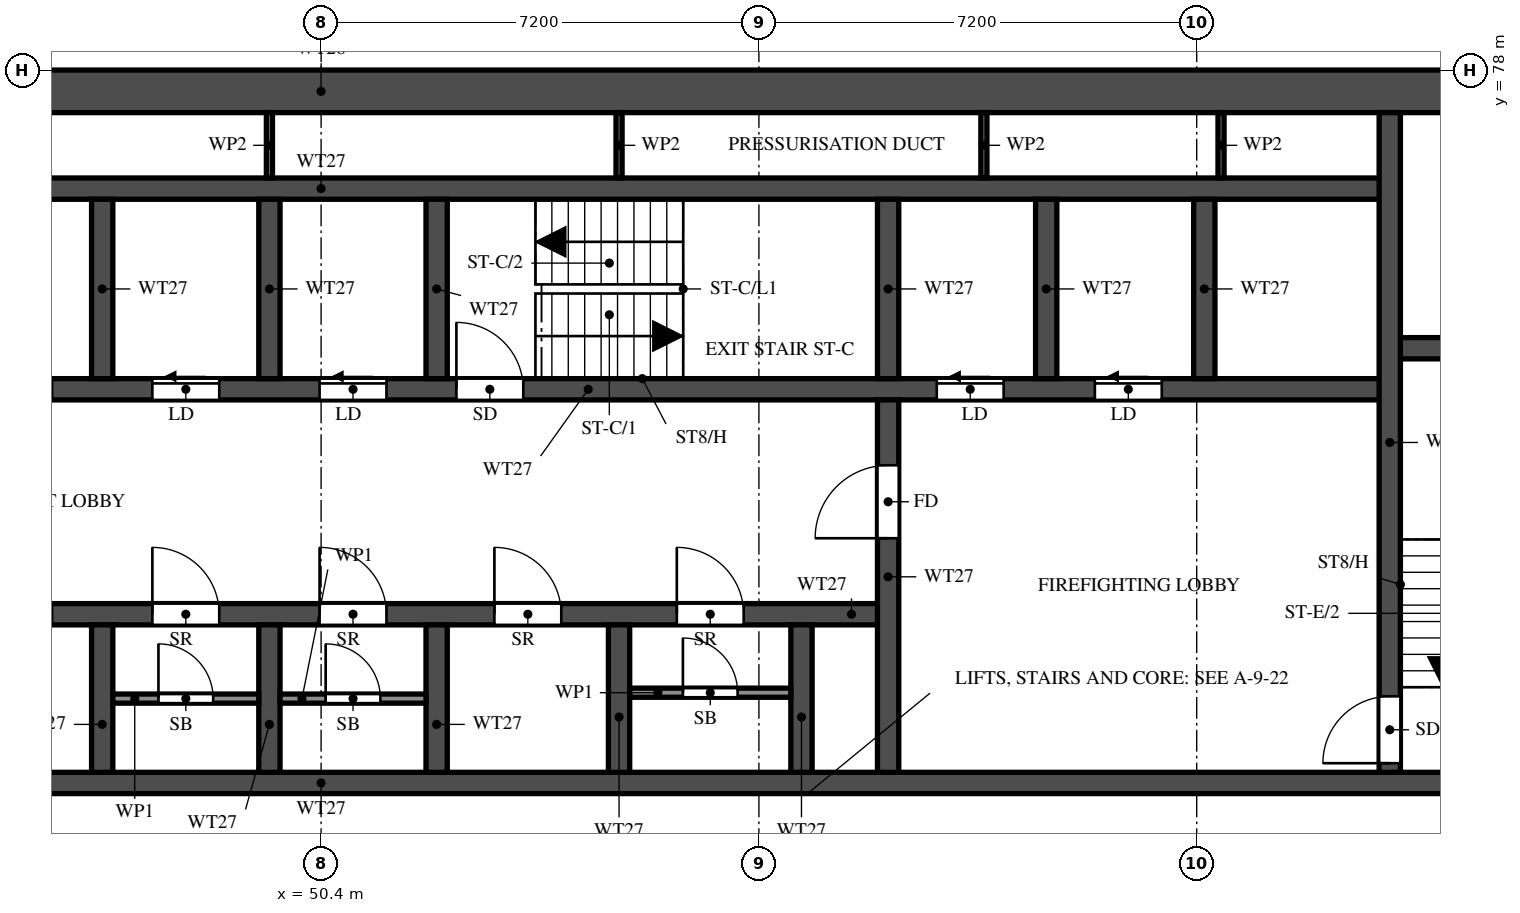
"""IFC4 building model, lengths in metres.
Left out: names, types, materials, properties, quantities, classifications, styles, units other than length and angle.
Written with IfcOpenShell. Run it as: python <this file> out.ifc"""

import sys

from ifc_helpers import new_model, si_unit, direction, frame, frame_2d, origin, place, context, subcontext, project, spatial, rectangle, extrude, element, fill, save


model = new_model("IFC4")
c1 = context("Model", 3, precision=1e-05, world=origin(), true_north=direction((0.0, 1.0)))
c2 = subcontext(c1, "Body", "Model", "MODEL_VIEW")
j1 = project(units=[si_unit("LENGTHUNIT", "METRE"), si_unit("PLANEANGLEUNIT", "RADIAN")], contexts=[c1])
p1 = place(None, origin())
s1 = spatial("IfcSite", under=j1, at=p1, CompositionType="ELEMENT")
p2 = place(p1, origin())
s2 = spatial("IfcBuilding", under=s1, at=p2, CompositionType="ELEMENT")
p3 = place(p2, frame((0.0, 0.0, 153.5)))
s3 = spatial("IfcBuildingStorey", under=s2, at=p3, CompositionType="ELEMENT", Elevation=153.5)
p4 = place(p3, frame((29.7, 77.65, 0.0), z_axis=(0.0, 0.0, 1.0), x_axis=(1.0, 0.0, 0.0)))
e1 = element("IfcWall", 1, at=p4, inside=s3, PredefinedType="SHEAR", context=c2, shape_type="SweptSolid", body=[
    extrude(rectangle(XDim=41.4, YDim=0.7, at=frame_2d((20.7, 0.0))), origin(), (0.0, 0.0, 1.0), 3.2),
])
p5 = place(p3, frame((29.7, 66.275, 0.0), z_axis=(0.0, 0.0, 1.0), x_axis=(1.0, 0.0, 0.0)))
e2 = element("IfcWall", 2, at=p5, inside=s3, PredefinedType="SHEAR", context=c2, shape_type="SweptSolid", body=[
    extrude(rectangle(XDim=41.4, YDim=0.35, at=frame_2d((20.7, 0.0))), origin(), (0.0, 0.0, 1.0), 3.2),
])
p6 = place(p5, frame((0.925, 0.0, 0.0)))
e3 = element("IfcOpeningElement", 3, at=p6, cuts=e2, PredefinedType="OPENING", context=c2, shape_type="SweptSolid", body=[
    extrude(rectangle(XDim=1.1, YDim=2.1, at=frame_2d((0.55, 1.05))), frame((0.0, 0.185, 0.0), z_axis=(0.0, -1.0, 0.0), x_axis=(1.0, 0.0, 0.0)), (0.0, 0.0, 1.0), 0.37),
])
p7 = place(p5, frame((3.712, 0.0, 0.0)))
e4 = element("IfcOpeningElement", 4, at=p7, cuts=e2, PredefinedType="OPENING", context=c2, shape_type="SweptSolid", body=[
    extrude(rectangle(XDim=1.8, YDim=2.1, at=frame_2d((0.9, 1.05))), frame((0.0, 0.185, 0.0), z_axis=(0.0, -1.0, 0.0), x_axis=(1.0, 0.0, 0.0)), (0.0, 0.0, 1.0), 0.37),
])
p8 = place(p3, frame((35.625, 69.05, 0.0), z_axis=(0.0, 0.0, 1.0), x_axis=(1.0, 0.0, 0.0)))
e5 = element("IfcWall", 5, at=p8, inside=s3, PredefinedType="SHEAR", context=c2, shape_type="SweptSolid", body=[
    extrude(rectangle(XDim=24.1, YDim=0.35, at=frame_2d((12.05, 0.0))), origin(), (0.0, 0.0, 1.0), 3.2),
])
p9 = place(p8, frame((1.0, 0.0, 0.0)))
e6 = element("IfcOpeningElement", 6, at=p9, cuts=e5, PredefinedType="OPENING", context=c2, shape_type="SweptSolid", body=[
    extrude(rectangle(XDim=1.1, YDim=2.1, at=frame_2d((0.55, 1.05))), frame((0.0, 0.185, 0.0), z_axis=(0.0, -1.0, 0.0), x_axis=(1.0, 0.0, 0.0)), (0.0, 0.0, 1.0), 0.37),
])
p10 = place(p8, frame((3.75, 0.0, 0.0)))
e7 = element("IfcOpeningElement", 7, at=p10, cuts=e5, PredefinedType="OPENING", context=c2, shape_type="SweptSolid", body=[
    extrude(rectangle(XDim=1.1, YDim=2.1, at=frame_2d((0.55, 1.05))), frame((0.0, 0.185, 0.0), z_axis=(0.0, -1.0, 0.0), x_axis=(1.0, 0.0, 0.0)), (0.0, 0.0, 1.0), 0.37),
])
p11 = place(p8, frame((6.5, 0.0, 0.0)))
e8 = element("IfcOpeningElement", 8, at=p11, cuts=e5, PredefinedType="OPENING", context=c2, shape_type="SweptSolid", body=[
    extrude(rectangle(XDim=1.1, YDim=2.1, at=frame_2d((0.55, 1.05))), frame((0.0, 0.185, 0.0), z_axis=(0.0, -1.0, 0.0), x_axis=(1.0, 0.0, 0.0)), (0.0, 0.0, 1.0), 0.37),
])
p12 = place(p8, frame((9.25, 0.0, 0.0)))
e9 = element("IfcOpeningElement", 9, at=p12, cuts=e5, PredefinedType="OPENING", context=c2, shape_type="SweptSolid", body=[
    extrude(rectangle(XDim=1.1, YDim=2.1, at=frame_2d((0.55, 1.05))), frame((0.0, 0.185, 0.0), z_axis=(0.0, -1.0, 0.0), x_axis=(1.0, 0.0, 0.0)), (0.0, 0.0, 1.0), 0.37),
])
p13 = place(p8, frame((12.0, 0.0, 0.0)))
e10 = element("IfcOpeningElement", 10, at=p13, cuts=e5, PredefinedType="OPENING", context=c2, shape_type="SweptSolid", body=[
    extrude(rectangle(XDim=1.1, YDim=2.1, at=frame_2d((0.55, 1.05))), frame((0.0, 0.185, 0.0), z_axis=(0.0, -1.0, 0.0), x_axis=(1.0, 0.0, 0.0)), (0.0, 0.0, 1.0), 0.37),
])
p14 = place(p8, frame((14.75, 0.0, 0.0)))
e11 = element("IfcOpeningElement", 11, at=p14, cuts=e5, PredefinedType="OPENING", context=c2, shape_type="SweptSolid", body=[
    extrude(rectangle(XDim=1.1, YDim=2.1, at=frame_2d((0.55, 1.05))), frame((0.0, 0.185, 0.0), z_axis=(0.0, -1.0, 0.0), x_axis=(1.0, 0.0, 0.0)), (0.0, 0.0, 1.0), 0.37),
])
p15 = place(p8, frame((17.625, 0.0, 0.0)))
e12 = element("IfcOpeningElement", 12, at=p15, cuts=e5, PredefinedType="OPENING", context=c2, shape_type="SweptSolid", body=[
    extrude(rectangle(XDim=1.1, YDim=2.1, at=frame_2d((0.55, 1.05))), frame((0.0, 0.185, 0.0), z_axis=(0.0, -1.0, 0.0), x_axis=(1.0, 0.0, 0.0)), (0.0, 0.0, 1.0), 0.37),
])
p16 = place(p8, frame((20.625, 0.0, 0.0)))
e13 = element("IfcOpeningElement", 13, at=p16, cuts=e5, PredefinedType="OPENING", context=c2, shape_type="SweptSolid", body=[
    extrude(rectangle(XDim=1.1, YDim=2.1, at=frame_2d((0.55, 1.05))), frame((0.0, 0.185, 0.0), z_axis=(0.0, -1.0, 0.0), x_axis=(1.0, 0.0, 0.0)), (0.0, 0.0, 1.0), 0.37),
])
p17 = place(p3, frame((32.825, 72.75, 0.0), z_axis=(0.0, 0.0, 1.0), x_axis=(1.0, 0.0, 0.0)))
e14 = element("IfcWall", 14, at=p17, inside=s3, PredefinedType="SHEAR", context=c2, shape_type="SweptSolid", body=[
    extrude(rectangle(XDim=35.15, YDim=0.35, at=frame_2d((17.575, 0.0))), origin(), (0.0, 0.0, 1.0), 3.2),
])
p18 = place(p17, frame((19.8, 0.0, 0.0)))
e15 = element("IfcOpeningElement", 15, at=p18, cuts=e14, PredefinedType="OPENING", context=c2, shape_type="SweptSolid", body=[
    extrude(rectangle(XDim=1.1, YDim=2.1, at=frame_2d((0.55, 1.05))), frame((0.0, 0.185, 0.0), z_axis=(0.0, -1.0, 0.0), x_axis=(1.0, 0.0, 0.0)), (0.0, 0.0, 1.0), 0.37),
])
p19 = place(p17, frame((27.7, 0.0, 0.0)))
e16 = element("IfcOpeningElement", 16, at=p19, cuts=e14, PredefinedType="OPENING", context=c2, shape_type="SweptSolid", body=[
    extrude(rectangle(XDim=1.1, YDim=2.1, at=frame_2d((0.55, 1.05))), frame((0.0, 0.185, 0.0), z_axis=(0.0, -1.0, 0.0), x_axis=(1.0, 0.0, 0.0)), (0.0, 0.0, 1.0), 0.37),
])
p20 = place(p17, frame((30.3, 0.0, 0.0)))
e17 = element("IfcOpeningElement", 17, at=p20, cuts=e14, PredefinedType="OPENING", context=c2, shape_type="SweptSolid", body=[
    extrude(rectangle(XDim=1.1, YDim=2.1, at=frame_2d((0.55, 1.05))), frame((0.0, 0.185, 0.0), z_axis=(0.0, -1.0, 0.0), x_axis=(1.0, 0.0, 0.0)), (0.0, 0.0, 1.0), 0.37),
])
p21 = place(p17, frame((3.8, 0.0, 0.0)))
e18 = element("IfcOpeningElement", 18, at=p21, cuts=e14, PredefinedType="OPENING", context=c2, shape_type="SweptSolid", body=[
    extrude(rectangle(XDim=1.1, YDim=2.1, at=frame_2d((0.55, 1.05))), frame((0.0, 0.185, 0.0), z_axis=(0.0, -1.0, 0.0), x_axis=(1.0, 0.0, 0.0)), (0.0, 0.0, 1.0), 0.37),
])
p22 = place(p17, frame((6.55, 0.0, 0.0)))
e19 = element("IfcOpeningElement", 19, at=p22, cuts=e14, PredefinedType="OPENING", context=c2, shape_type="SweptSolid", body=[
    extrude(rectangle(XDim=1.1, YDim=2.1, at=frame_2d((0.55, 1.05))), frame((0.0, 0.185, 0.0), z_axis=(0.0, -1.0, 0.0), x_axis=(1.0, 0.0, 0.0)), (0.0, 0.0, 1.0), 0.37),
])
p23 = place(p17, frame((9.3, 0.0, 0.0)))
e20 = element("IfcOpeningElement", 20, at=p23, cuts=e14, PredefinedType="OPENING", context=c2, shape_type="SweptSolid", body=[
    extrude(rectangle(XDim=1.1, YDim=2.1, at=frame_2d((0.55, 1.05))), frame((0.0, 0.185, 0.0), z_axis=(0.0, -1.0, 0.0), x_axis=(1.0, 0.0, 0.0)), (0.0, 0.0, 1.0), 0.37),
])
p24 = place(p17, frame((12.05, 0.0, 0.0)))
e21 = element("IfcOpeningElement", 21, at=p24, cuts=e14, PredefinedType="OPENING", context=c2, shape_type="SweptSolid", body=[
    extrude(rectangle(XDim=1.1, YDim=2.1, at=frame_2d((0.55, 1.05))), frame((0.0, 0.185, 0.0), z_axis=(0.0, -1.0, 0.0), x_axis=(1.0, 0.0, 0.0)), (0.0, 0.0, 1.0), 0.37),
])
p25 = place(p17, frame((14.8, 0.0, 0.0)))
e22 = element("IfcOpeningElement", 22, at=p25, cuts=e14, PredefinedType="OPENING", context=c2, shape_type="SweptSolid", body=[
    extrude(rectangle(XDim=1.1, YDim=2.1, at=frame_2d((0.55, 1.05))), frame((0.0, 0.185, 0.0), z_axis=(0.0, -1.0, 0.0), x_axis=(1.0, 0.0, 0.0)), (0.0, 0.0, 1.0), 0.37),
])
p26 = place(p17, frame((17.55, 0.0, 0.0)))
e23 = element("IfcOpeningElement", 23, at=p26, cuts=e14, PredefinedType="OPENING", context=c2, shape_type="SweptSolid", body=[
    extrude(rectangle(XDim=1.1, YDim=2.1, at=frame_2d((0.55, 1.05))), frame((0.0, 0.185, 0.0), z_axis=(0.0, -1.0, 0.0), x_axis=(1.0, 0.0, 0.0)), (0.0, 0.0, 1.0), 0.37),
])
p27 = place(p17, frame((0.938, 0.0, 0.0)))
e24 = element("IfcOpeningElement", 24, at=p27, cuts=e14, PredefinedType="OPENING", context=c2, shape_type="SweptSolid", body=[
    extrude(rectangle(XDim=1.1, YDim=2.1, at=frame_2d((0.55, 1.05))), frame((0.0, 0.185, 0.0), z_axis=(0.0, -1.0, 0.0), x_axis=(1.0, 0.0, 0.0)), (0.0, 0.0, 1.0), 0.37),
])
p28 = place(p3, frame((32.825, 76.05, 0.0), z_axis=(0.0, 0.0, 1.0), x_axis=(1.0, 0.0, 0.0)))
e25 = element("IfcWall", 25, at=p28, inside=s3, PredefinedType="SHEAR", context=c2, shape_type="SweptSolid", body=[
    extrude(rectangle(XDim=35.15, YDim=0.35, at=frame_2d((17.575, 0.0))), origin(), (0.0, 0.0, 1.0), 3.2),
])
p29 = place(p3, frame((67.975, 73.425, 0.0), z_axis=(0.0, 0.0, 1.0), x_axis=(1.0, 0.0, 0.0)))
e26 = element("IfcWall", 26, at=p29, inside=s3, PredefinedType="SHEAR", context=c2, shape_type="SweptSolid", body=[
    extrude(rectangle(XDim=3.125, YDim=0.35, at=frame_2d((1.562, 0.0))), origin(), (0.0, 0.0, 1.0), 3.2),
])
p30 = place(p3, frame((67.975, 66.45, 0.0), z_axis=(0.0, 0.0, 1.0), x_axis=(0.0, 1.0, 0.0)))
e27 = element("IfcWall", 27, at=p30, inside=s3, PredefinedType="SHEAR", context=c2, shape_type="SweptSolid", body=[
    extrude(rectangle(XDim=10.85, YDim=0.35, at=frame_2d((5.425, 0.0))), origin(), (0.0, 0.0, 1.0), 3.2),
])
p31 = place(p30, frame((0.15, 0.0, 0.0)))
e28 = element("IfcOpeningElement", 28, at=p31, cuts=e27, PredefinedType="OPENING", context=c2, shape_type="SweptSolid", body=[
    extrude(rectangle(XDim=1.1, YDim=2.1, at=frame_2d((0.55, 1.05))), frame((0.0, 0.185, 0.0), z_axis=(0.0, -1.0, 0.0), x_axis=(1.0, 0.0, 0.0)), (0.0, 0.0, 1.0), 0.37),
])
p32 = place(p3, frame((59.725, 66.45, 0.0), z_axis=(0.0, 0.0, 1.0), x_axis=(0.0, 1.0, 0.0)))
e29 = element("IfcWall", 29, at=p32, inside=s3, PredefinedType="SHEAR", context=c2, shape_type="SweptSolid", body=[
    extrude(rectangle(XDim=6.125, YDim=0.35, at=frame_2d((3.062, 0.0))), origin(), (0.0, 0.0, 1.0), 3.2),
])
p33 = place(p32, frame((3.85, 0.0, 0.0)))
e30 = element("IfcOpeningElement", 30, at=p33, cuts=e29, PredefinedType="OPENING", context=c2, shape_type="SweptSolid", body=[
    extrude(rectangle(XDim=1.2, YDim=2.1, at=frame_2d((0.6, 1.05))), frame((0.0, 0.185, 0.0), z_axis=(0.0, -1.0, 0.0), x_axis=(1.0, 0.0, 0.0)), (0.0, 0.0, 1.0), 0.37),
])
p34 = place(p3, frame((59.725, 72.925, 0.0), z_axis=(0.0, 0.0, 1.0), x_axis=(0.0, 1.0, 0.0)))
e31 = element("IfcWall", 31, at=p34, inside=s3, PredefinedType="SHEAR", context=c2, shape_type="SweptSolid", body=[
    extrude(rectangle(XDim=2.95, YDim=0.35, at=frame_2d((1.475, 0.0))), origin(), (0.0, 0.0, 1.0), 3.2),
])
for number, where, z_axis, x_axis in (
    (32, (46.8, 66.45, 0.0), (0.0, 0.0, 1.0), (0.0, 1.0, 0.0)),
    (33, (49.55, 66.45, 0.0), (0.0, 0.0, 1.0), (0.0, 1.0, 0.0)),
    (34, (52.3, 66.45, 0.0), (0.0, 0.0, 1.0), (0.0, 1.0, 0.0)),
    (35, (55.3, 66.45, 0.0), (0.0, 0.0, 1.0), (0.0, 1.0, 0.0)),
    (36, (58.3, 66.45, 0.0), (0.0, 0.0, 1.0), (0.0, 1.0, 0.0)),
):
    element("IfcWall", number, at=place(p3, frame(where, z_axis=z_axis, x_axis=x_axis)), inside=s3, PredefinedType="SHEAR", context=c2, shape_type="SweptSolid", body=[
        extrude(rectangle(XDim=2.425, YDim=0.35, at=frame_2d((1.212, 0.0))), origin(), (0.0, 0.0, 1.0), 3.2),
    ])
for number, where, z_axis, x_axis in (
    (37, (46.8, 72.925, 0.0), (0.0, 0.0, 1.0), (0.0, 1.0, 0.0)),
    (38, (49.55, 72.925, 0.0), (0.0, 0.0, 1.0), (0.0, 1.0, 0.0)),
    (39, (52.3, 72.925, 0.0), (0.0, 0.0, 1.0), (0.0, 1.0, 0.0)),
    (40, (62.325, 72.925, 0.0), (0.0, 0.0, 1.0), (0.0, 1.0, 0.0)),
    (41, (64.925, 72.925, 0.0), (0.0, 0.0, 1.0), (0.0, 1.0, 0.0)),
):
    element("IfcWall", number, at=place(p3, frame(where, z_axis=z_axis, x_axis=x_axis)), inside=s3, PredefinedType="SHEAR", context=c2, shape_type="SweptSolid", body=[
        extrude(rectangle(XDim=2.95, YDim=0.35, at=frame_2d((1.475, 0.0))), origin(), (0.0, 0.0, 1.0), 3.2),
    ])
p35 = place(p3, frame((46.975, 67.663, 0.0), z_axis=(0.0, 0.0, 1.0), x_axis=(1.0, 0.0, 0.0)))
e42 = element("IfcWall", 42, at=p35, inside=s3, PredefinedType="PARTITIONING", context=c2, shape_type="SweptSolid", body=[
    extrude(rectangle(XDim=2.4, YDim=0.15, at=frame_2d((1.2, 0.0))), origin(), (0.0, 0.0, 1.0), 3.2),
])
p36 = place(p35, frame((0.75, 0.0, 0.0)))
e43 = element("IfcOpeningElement", 43, at=p36, cuts=e42, PredefinedType="OPENING", context=c2, shape_type="SweptSolid", body=[
    extrude(rectangle(XDim=0.9, YDim=2.1, at=frame_2d((0.45, 1.05))), frame((0.0, 0.085, 0.0), z_axis=(0.0, -1.0, 0.0), x_axis=(1.0, 0.0, 0.0)), (0.0, 0.0, 1.0), 0.17),
])
p37 = place(p3, frame((49.725, 67.663, 0.0), z_axis=(0.0, 0.0, 1.0), x_axis=(1.0, 0.0, 0.0)))
e44 = element("IfcWall", 44, at=p37, inside=s3, PredefinedType="PARTITIONING", context=c2, shape_type="SweptSolid", body=[
    extrude(rectangle(XDim=2.4, YDim=0.15, at=frame_2d((1.2, 0.0))), origin(), (0.0, 0.0, 1.0), 3.2),
])
p38 = place(p37, frame((0.75, 0.0, 0.0)))
e45 = element("IfcOpeningElement", 45, at=p38, cuts=e44, PredefinedType="OPENING", context=c2, shape_type="SweptSolid", body=[
    extrude(rectangle(XDim=0.9, YDim=2.1, at=frame_2d((0.45, 1.05))), frame((0.0, 0.085, 0.0), z_axis=(0.0, -1.0, 0.0), x_axis=(1.0, 0.0, 0.0)), (0.0, 0.0, 1.0), 0.17),
])
p39 = place(p3, frame((55.475, 67.76, 0.0), z_axis=(0.0, 0.0, 1.0), x_axis=(1.0, 0.0, 0.0)))
e46 = element("IfcWall", 46, at=p39, inside=s3, PredefinedType="PARTITIONING", context=c2, shape_type="SweptSolid", body=[
    extrude(rectangle(XDim=2.65, YDim=0.15, at=frame_2d((1.325, 0.0))), origin(), (0.0, 0.0, 1.0), 3.2),
])
p40 = place(p39, frame((0.875, 0.0, 0.0)))
e47 = element("IfcOpeningElement", 47, at=p40, cuts=e46, PredefinedType="OPENING", context=c2, shape_type="SweptSolid", body=[
    extrude(rectangle(XDim=0.9, YDim=2.1, at=frame_2d((0.45, 1.05))), frame((0.0, 0.085, 0.0), z_axis=(0.0, -1.0, 0.0), x_axis=(1.0, 0.0, 0.0)), (0.0, 0.0, 1.0), 0.17),
])
for number, where, z_axis, x_axis in (
    (48, (49.55, 76.225, 0.0), (0.0, 0.0, 1.0), (0.0, 1.0, 0.0)),
    (49, (55.3, 76.225, 0.0), (0.0, 0.0, 1.0), (0.0, 1.0, 0.0)),
    (50, (61.3, 76.225, 0.0), (0.0, 0.0, 1.0), (0.0, 1.0, 0.0)),
    (51, (65.2, 76.225, 0.0), (0.0, 0.0, 1.0), (0.0, 1.0, 0.0)),
):
    element("IfcWall", number, at=place(p3, frame(where, z_axis=z_axis, x_axis=x_axis)), inside=s3, PredefinedType="PARTITIONING", context=c2, shape_type="SweptSolid", body=[
        extrude(rectangle(XDim=1.075, YDim=0.1, at=frame_2d((0.538, 0.0))), origin(), (0.0, 0.0, 1.0), 3.2),
    ])
p41 = place(p18, origin())
e52 = element("IfcDoor", 52, at=p41, inside=s3, OperationType="SINGLE_SWING_LEFT", PredefinedType="DOOR", context=c2, shape_type="SweptSolid", body=[
    extrude(rectangle(XDim=1.1, YDim=2.1, at=frame_2d((0.55, 1.05))), frame((0.0, 0.025, 0.0), z_axis=(0.0, -1.0, 0.0), x_axis=(1.0, 0.0, 0.0)), (0.0, 0.0, 1.0), 0.05),
])
fill(e15, e52)
p42 = place(p31, origin())
e53 = element("IfcDoor", 53, at=p42, inside=s3, OperationType="SINGLE_SWING_LEFT", PredefinedType="DOOR", context=c2, shape_type="SweptSolid", body=[
    extrude(rectangle(XDim=1.1, YDim=2.1, at=frame_2d((0.55, 1.05))), frame((0.0, 0.025, 0.0), z_axis=(0.0, -1.0, 0.0), x_axis=(1.0, 0.0, 0.0)), (0.0, 0.0, 1.0), 0.05),
])
fill(e28, e53)
p43 = place(p33, origin())
e54 = element("IfcDoor", 54, at=p43, inside=s3, OperationType="SINGLE_SWING_LEFT", PredefinedType="DOOR", context=c2, shape_type="SweptSolid", body=[
    extrude(rectangle(XDim=1.2, YDim=2.1, at=frame_2d((0.6, 1.05))), frame((0.0, 0.025, 0.0), z_axis=(0.0, -1.0, 0.0), x_axis=(1.0, 0.0, 0.0)), (0.0, 0.0, 1.0), 0.05),
])
fill(e30, e54)
p44 = place(p19, origin())
e55 = element("IfcDoor", 55, at=p44, inside=s3, OperationType="SLIDING_TO_LEFT", PredefinedType="DOOR", context=c2, shape_type="SweptSolid", body=[
    extrude(rectangle(XDim=1.1, YDim=2.1, at=frame_2d((0.55, 1.05))), frame((0.0, 0.025, 0.0), z_axis=(0.0, -1.0, 0.0), x_axis=(1.0, 0.0, 0.0)), (0.0, 0.0, 1.0), 0.05),
])
fill(e16, e55)
p45 = place(p20, origin())
e56 = element("IfcDoor", 56, at=p45, inside=s3, OperationType="SLIDING_TO_LEFT", PredefinedType="DOOR", context=c2, shape_type="SweptSolid", body=[
    extrude(rectangle(XDim=1.1, YDim=2.1, at=frame_2d((0.55, 1.05))), frame((0.0, 0.025, 0.0), z_axis=(0.0, -1.0, 0.0), x_axis=(1.0, 0.0, 0.0)), (0.0, 0.0, 1.0), 0.05),
])
fill(e17, e56)
p46 = place(p13, origin())
e57 = element("IfcDoor", 57, at=p46, inside=s3, OperationType="SINGLE_SWING_RIGHT", PredefinedType="DOOR", context=c2, shape_type="SweptSolid", body=[
    extrude(rectangle(XDim=1.1, YDim=2.1, at=frame_2d((0.55, 1.05))), frame((0.0, 0.025, 0.0), z_axis=(0.0, -1.0, 0.0), x_axis=(1.0, 0.0, 0.0)), (0.0, 0.0, 1.0), 0.05),
])
fill(e10, e57)
p47 = place(p36, origin())
e58 = element("IfcDoor", 58, at=p47, inside=s3, OperationType="SINGLE_SWING_RIGHT", PredefinedType="DOOR", context=c2, shape_type="SweptSolid", body=[
    extrude(rectangle(XDim=0.9, YDim=2.1, at=frame_2d((0.45, 1.05))), frame((0.0, 0.025, 0.0), z_axis=(0.0, -1.0, 0.0), x_axis=(1.0, 0.0, 0.0)), (0.0, 0.0, 1.0), 0.05),
])
fill(e43, e58)
p48 = place(p14, origin())
e59 = element("IfcDoor", 59, at=p48, inside=s3, OperationType="SINGLE_SWING_LEFT", PredefinedType="DOOR", context=c2, shape_type="SweptSolid", body=[
    extrude(rectangle(XDim=1.1, YDim=2.1, at=frame_2d((0.55, 1.05))), frame((0.0, 0.025, 0.0), z_axis=(0.0, -1.0, 0.0), x_axis=(1.0, 0.0, 0.0)), (0.0, 0.0, 1.0), 0.05),
])
fill(e11, e59)
p49 = place(p38, origin())
e60 = element("IfcDoor", 60, at=p49, inside=s3, OperationType="SINGLE_SWING_LEFT", PredefinedType="DOOR", context=c2, shape_type="SweptSolid", body=[
    extrude(rectangle(XDim=0.9, YDim=2.1, at=frame_2d((0.45, 1.05))), frame((0.0, 0.025, 0.0), z_axis=(0.0, -1.0, 0.0), x_axis=(1.0, 0.0, 0.0)), (0.0, 0.0, 1.0), 0.05),
])
fill(e45, e60)
p50 = place(p15, origin())
e61 = element("IfcDoor", 61, at=p50, inside=s3, OperationType="SINGLE_SWING_RIGHT", PredefinedType="DOOR", context=c2, shape_type="SweptSolid", body=[
    extrude(rectangle(XDim=1.1, YDim=2.1, at=frame_2d((0.55, 1.05))), frame((0.0, 0.025, 0.0), z_axis=(0.0, -1.0, 0.0), x_axis=(1.0, 0.0, 0.0)), (0.0, 0.0, 1.0), 0.05),
])
fill(e12, e61)
p51 = place(p16, origin())
e62 = element("IfcDoor", 62, at=p51, inside=s3, OperationType="SINGLE_SWING_RIGHT", PredefinedType="DOOR", context=c2, shape_type="SweptSolid", body=[
    extrude(rectangle(XDim=1.1, YDim=2.1, at=frame_2d((0.55, 1.05))), frame((0.0, 0.025, 0.0), z_axis=(0.0, -1.0, 0.0), x_axis=(1.0, 0.0, 0.0)), (0.0, 0.0, 1.0), 0.05),
])
fill(e13, e62)
p52 = place(p40, origin())
e63 = element("IfcDoor", 63, at=p52, inside=s3, OperationType="SINGLE_SWING_LEFT", PredefinedType="DOOR", context=c2, shape_type="SweptSolid", body=[
    extrude(rectangle(XDim=0.9, YDim=2.1, at=frame_2d((0.45, 1.05))), frame((0.0, 0.025, 0.0), z_axis=(0.0, -1.0, 0.0), x_axis=(1.0, 0.0, 0.0)), (0.0, 0.0, 1.0), 0.05),
])
fill(e47, e63)
p53 = place(p25, origin())
e64 = element("IfcDoor", 64, at=p53, inside=s3, OperationType="SLIDING_TO_LEFT", PredefinedType="DOOR", context=c2, shape_type="SweptSolid", body=[
    extrude(rectangle(XDim=1.1, YDim=2.1, at=frame_2d((0.55, 1.05))), frame((0.0, 0.025, 0.0), z_axis=(0.0, -1.0, 0.0), x_axis=(1.0, 0.0, 0.0)), (0.0, 0.0, 1.0), 0.05),
])
fill(e22, e64)
p54 = place(p26, origin())
e65 = element("IfcDoor", 65, at=p54, inside=s3, OperationType="SLIDING_TO_LEFT", PredefinedType="DOOR", context=c2, shape_type="SweptSolid", body=[
    extrude(rectangle(XDim=1.1, YDim=2.1, at=frame_2d((0.55, 1.05))), frame((0.0, 0.025, 0.0), z_axis=(0.0, -1.0, 0.0), x_axis=(1.0, 0.0, 0.0)), (0.0, 0.0, 1.0), 0.05),
])
fill(e23, e65)
save(model, sys.argv[1])
